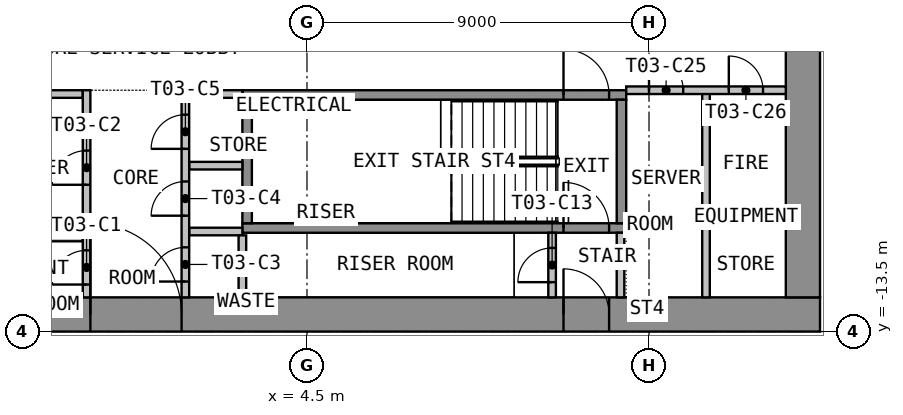
"""IFC4 building model, lengths in metres.
Left out: names, types, materials, properties, quantities, classifications, styles, units other than length and angle.
Written with IfcOpenShell. Run it as: python <this file> out.ifc"""

import sys

from ifc_helpers import new_model, si_unit, direction, frame, frame_2d, origin, place, context, subcontext, project, spatial, rectangle, extrude, element, fill, save


model = new_model("IFC4")
c1 = context("Model", 3, precision=1e-05, world=origin(), true_north=direction((0.0, 1.0)))
c2 = subcontext(c1, "Body", "Model", "MODEL_VIEW")
j1 = project(units=[si_unit("LENGTHUNIT", "METRE"), si_unit("PLANEANGLEUNIT", "RADIAN")], contexts=[c1])
p1 = place(None, origin())
s1 = spatial("IfcSite", under=j1, at=p1, CompositionType="ELEMENT")
p2 = place(p1, origin())
s2 = spatial("IfcBuilding", under=s1, at=p2, CompositionType="ELEMENT")
p3 = place(p2, frame((0.0, 0.0, 53.4)))
s3 = spatial("IfcBuildingStorey", under=s2, at=p3, CompositionType="ELEMENT", Elevation=53.4)
p4 = place(p3, frame((-18.0, -13.05, 0.0), z_axis=(0.0, 0.0, 1.0), x_axis=(1.0, 0.0, 0.0)))
e1 = element("IfcWall", 1, at=p4, inside=s3, PredefinedType="SHEAR", context=c2, shape_type="SweptSolid", body=[
    extrude(rectangle(XDim=36.0, YDim=0.9, at=frame_2d((18.0, 0.0))), origin(), (0.0, 0.0, 1.0), 3.525),
])
p5 = place(p4, frame((16.8, 0.0, 0.0)))
e2 = element("IfcOpeningElement", 2, at=p5, cuts=e1, PredefinedType="OPENING", context=c2, shape_type="SweptSolid", body=[
    extrude(rectangle(XDim=2.4, YDim=2.1, at=frame_2d((1.2, 1.05))), frame((0.0, 0.46, 0.0), z_axis=(0.0, -1.0, 0.0), x_axis=(1.0, 0.0, 0.0)), (0.0, 0.0, 1.0), 0.92),
])
p6 = place(p4, frame((5.55, 0.0, 0.0)))
e3 = element("IfcOpeningElement", 3, at=p6, cuts=e1, PredefinedType="OPENING", context=c2, shape_type="SweptSolid", body=[
    extrude(rectangle(XDim=1.2, YDim=2.1, at=frame_2d((0.6, 1.05))), frame((0.0, 0.46, 0.0), z_axis=(0.0, -1.0, 0.0), x_axis=(1.0, 0.0, 0.0)), (0.0, 0.0, 1.0), 0.92),
])
p7 = place(p4, frame((29.25, 0.0, 0.0)))
e4 = element("IfcOpeningElement", 4, at=p7, cuts=e1, PredefinedType="OPENING", context=c2, shape_type="SweptSolid", body=[
    extrude(rectangle(XDim=1.2, YDim=2.1, at=frame_2d((0.6, 1.05))), frame((0.0, 0.46, 0.0), z_axis=(0.0, -1.0, 0.0), x_axis=(1.0, 0.0, 0.0)), (0.0, 0.0, 1.0), 0.92),
])
p8 = place(p3, frame((17.55, -12.6, 0.0), z_axis=(0.0, 0.0, 1.0), x_axis=(0.0, 1.0, 0.0)))
e5 = element("IfcWall", 5, at=p8, inside=s3, PredefinedType="SHEAR", context=c2, shape_type="SweptSolid", body=[
    extrude(rectangle(XDim=25.2, YDim=0.9, at=frame_2d((12.6, 0.0))), origin(), (0.0, 0.0, 1.0), 3.525),
])
p9 = place(p8, frame((11.4, 0.0, 0.0)))
e6 = element("IfcOpeningElement", 6, at=p9, cuts=e5, PredefinedType="OPENING", context=c2, shape_type="SweptSolid", body=[
    extrude(rectangle(XDim=2.4, YDim=2.1, at=frame_2d((1.2, 1.05))), frame((0.0, 0.46, 0.0), z_axis=(0.0, -1.0, 0.0), x_axis=(1.0, 0.0, 0.0)), (0.0, 0.0, 1.0), 0.92),
])
p10 = place(p3, frame((2.8, -10.775, 0.0), z_axis=(0.0, 0.0, 1.0), x_axis=(1.0, 0.0, 0.0)))
e7 = element("IfcWall", 7, at=p10, inside=s3, PredefinedType="SHEAR", context=c2, shape_type="SweptSolid", body=[
    extrude(rectangle(XDim=10.1, YDim=0.25, at=frame_2d((5.05, 0.0))), origin(), (0.0, 0.0, 1.0), 3.525),
])
p11 = place(p10, frame((8.45, 0.0, 0.0)))
e8 = element("IfcOpeningElement", 8, at=p11, cuts=e7, PredefinedType="OPENING", context=c2, shape_type="SweptSolid", body=[
    extrude(rectangle(XDim=1.2, YDim=2.1, at=frame_2d((0.6, 1.05))), frame((0.0, 0.135, 0.0), z_axis=(0.0, -1.0, 0.0), x_axis=(1.0, 0.0, 0.0)), (0.0, 0.0, 1.0), 0.27),
])
p12 = place(p3, frame((2.8, -7.275, 0.0), z_axis=(0.0, 0.0, 1.0), x_axis=(1.0, 0.0, 0.0)))
e9 = element("IfcWall", 9, at=p12, inside=s3, PredefinedType="SHEAR", context=c2, shape_type="SweptSolid", body=[
    extrude(rectangle(XDim=10.1, YDim=0.25, at=frame_2d((5.05, 0.0))), origin(), (0.0, 0.0, 1.0), 3.525),
])
p13 = place(p12, frame((8.45, 0.0, 0.0)))
e10 = element("IfcOpeningElement", 10, at=p13, cuts=e9, PredefinedType="OPENING", context=c2, shape_type="SweptSolid", body=[
    extrude(rectangle(XDim=1.2, YDim=2.1, at=frame_2d((0.6, 1.05))), frame((0.0, 0.135, 0.0), z_axis=(0.0, -1.0, 0.0), x_axis=(1.0, 0.0, 0.0)), (0.0, 0.0, 1.0), 0.27),
])
for number, where, z_axis, x_axis in (
    (11, (2.925, -10.65, 0.0), (0.0, 0.0, 1.0), (0.0, 1.0, 0.0)),
    (12, (12.775, -10.65, 0.0), (0.0, 0.0, 1.0), (0.0, 1.0, 0.0)),
):
    element("IfcWall", number, at=place(p3, frame(where, z_axis=z_axis, x_axis=x_axis)), inside=s3, PredefinedType="SHEAR", context=c2, shape_type="SweptSolid", body=[
        extrude(rectangle(XDim=3.25, YDim=0.25, at=frame_2d((1.625, 0.0))), origin(), (0.0, 0.0, 1.0), 3.525),
    ])
for number, where, z_axis, x_axis in (
    (13, (-2.8, -7.25, 0.0), (0.0, 0.0, 1.0), (1.0, 0.0, 0.0)),
    (14, (-2.8, -11.025, 0.0), (0.0, 0.0, 1.0), (1.0, 0.0, 0.0)),
    (15, (1.4, -7.25, 0.0), (0.0, 0.0, 1.0), (1.0, 0.0, 0.0)),
    (16, (1.4, -9.135, 0.0), (0.0, 0.0, 1.0), (1.0, 0.0, 0.0)),
    (17, (1.4, -10.867, 0.0), (0.0, 0.0, 1.0), (1.0, 0.0, 0.0)),
):
    element("IfcWall", number, at=place(p3, frame(where, z_axis=z_axis, x_axis=x_axis)), inside=s3, PredefinedType="PARTITIONING", context=c2, shape_type="SweptSolid", body=[
        extrude(rectangle(XDim=1.4, YDim=0.2, at=frame_2d((0.7, 0.0))), origin(), (0.0, 0.0, 1.0), 3.525),
    ])
p14 = place(p3, frame((-1.3, -12.6, 0.0), z_axis=(0.0, 0.0, 1.0), x_axis=(0.0, 1.0, 0.0)))
e18 = element("IfcWall", 18, at=p14, inside=s3, PredefinedType="PARTITIONING", context=c2, shape_type="SweptSolid", body=[
    extrude(rectangle(XDim=5.45, YDim=0.2, at=frame_2d((2.725, 0.0))), origin(), (0.0, 0.0, 1.0), 3.525),
])
p15 = place(p14, frame((0.337, 0.0, 0.0)))
e19 = element("IfcOpeningElement", 19, at=p15, cuts=e18, PredefinedType="OPENING", context=c2, shape_type="SweptSolid", body=[
    extrude(rectangle(XDim=0.9, YDim=2.1, at=frame_2d((0.45, 1.05))), frame((0.0, 0.11, 0.0), z_axis=(0.0, -1.0, 0.0), x_axis=(1.0, 0.0, 0.0)), (0.0, 0.0, 1.0), 0.22),
])
p16 = place(p14, frame((2.962, 0.0, 0.0)))
e20 = element("IfcOpeningElement", 20, at=p16, cuts=e18, PredefinedType="OPENING", context=c2, shape_type="SweptSolid", body=[
    extrude(rectangle(XDim=0.9, YDim=2.1, at=frame_2d((0.45, 1.05))), frame((0.0, 0.11, 0.0), z_axis=(0.0, -1.0, 0.0), x_axis=(1.0, 0.0, 0.0)), (0.0, 0.0, 1.0), 0.22),
])
p17 = place(p3, frame((1.3, -12.6, 0.0), z_axis=(0.0, 0.0, 1.0), x_axis=(0.0, 1.0, 0.0)))
e21 = element("IfcWall", 21, at=p17, inside=s3, PredefinedType="PARTITIONING", context=c2, shape_type="SweptSolid", body=[
    extrude(rectangle(XDim=5.45, YDim=0.2, at=frame_2d((2.725, 0.0))), origin(), (0.0, 0.0, 1.0), 3.525),
])
p18 = place(p17, frame((0.416, 0.0, 0.0)))
e22 = element("IfcOpeningElement", 22, at=p18, cuts=e21, PredefinedType="OPENING", context=c2, shape_type="SweptSolid", body=[
    extrude(rectangle(XDim=0.9, YDim=2.1, at=frame_2d((0.45, 1.05))), frame((0.0, 0.11, 0.0), z_axis=(0.0, -1.0, 0.0), x_axis=(1.0, 0.0, 0.0)), (0.0, 0.0, 1.0), 0.22),
])
p19 = place(p17, frame((2.149, 0.0, 0.0)))
e23 = element("IfcOpeningElement", 23, at=p19, cuts=e21, PredefinedType="OPENING", context=c2, shape_type="SweptSolid", body=[
    extrude(rectangle(XDim=0.9, YDim=2.1, at=frame_2d((0.45, 1.05))), frame((0.0, 0.11, 0.0), z_axis=(0.0, -1.0, 0.0), x_axis=(1.0, 0.0, 0.0)), (0.0, 0.0, 1.0), 0.22),
])
p20 = place(p17, frame((3.907, 0.0, 0.0)))
e24 = element("IfcOpeningElement", 24, at=p20, cuts=e21, PredefinedType="OPENING", context=c2, shape_type="SweptSolid", body=[
    extrude(rectangle(XDim=0.9, YDim=2.1, at=frame_2d((0.45, 1.05))), frame((0.0, 0.11, 0.0), z_axis=(0.0, -1.0, 0.0), x_axis=(1.0, 0.0, 0.0)), (0.0, 0.0, 1.0), 0.22),
])
p21 = place(p3, frame((12.75, -12.6, 0.0), z_axis=(0.0, 0.0, 1.0), x_axis=(0.0, 1.0, 0.0)))
e25 = element("IfcWall", 25, at=p21, inside=s3, PredefinedType="PARTITIONING", context=c2, shape_type="SweptSolid", body=[
    extrude(rectangle(XDim=1.7, YDim=0.2, at=frame_2d((0.85, 0.0))), origin(), (0.0, 0.0, 1.0), 3.525),
])
p22 = place(p3, frame((10.95, -12.6, 0.0), z_axis=(0.0, 0.0, 1.0), x_axis=(0.0, 1.0, 0.0)))
e26 = element("IfcWall", 26, at=p22, inside=s3, PredefinedType="PARTITIONING", context=c2, shape_type="SweptSolid", body=[
    extrude(rectangle(XDim=1.7, YDim=0.2, at=frame_2d((0.85, 0.0))), origin(), (0.0, 0.0, 1.0), 3.525),
])
p23 = place(p22, frame((0.4, 0.0, 0.0)))
e27 = element("IfcOpeningElement", 27, at=p23, cuts=e26, PredefinedType="OPENING", context=c2, shape_type="SweptSolid", body=[
    extrude(rectangle(XDim=0.9, YDim=2.1, at=frame_2d((0.45, 1.05))), frame((0.0, 0.11, 0.0), z_axis=(0.0, -1.0, 0.0), x_axis=(1.0, 0.0, 0.0)), (0.0, 0.0, 1.0), 0.22),
])
p24 = place(p3, frame((15.0, -12.6, 0.0), z_axis=(0.0, 0.0, 1.0), x_axis=(0.0, 1.0, 0.0)))
e28 = element("IfcWall", 28, at=p24, inside=s3, PredefinedType="PARTITIONING", context=c2, shape_type="SweptSolid", body=[
    extrude(rectangle(XDim=5.45, YDim=0.2, at=frame_2d((2.725, 0.0))), origin(), (0.0, 0.0, 1.0), 3.525),
])
p25 = place(p3, frame((12.9, -7.15, 0.0), z_axis=(0.0, 0.0, 1.0), x_axis=(1.0, 0.0, 0.0)))
e29 = element("IfcWall", 29, at=p25, inside=s3, PredefinedType="PARTITIONING", context=c2, shape_type="SweptSolid", body=[
    extrude(rectangle(XDim=4.2, YDim=0.2, at=frame_2d((2.1, 0.0))), origin(), (0.0, 0.0, 1.0), 3.525),
])
p26 = place(p25, frame((0.6, 0.0, 0.0)))
e30 = element("IfcOpeningElement", 30, at=p26, cuts=e29, PredefinedType="OPENING", context=c2, shape_type="SweptSolid", body=[
    extrude(rectangle(XDim=0.9, YDim=2.1, at=frame_2d((0.45, 1.05))), frame((0.0, 0.11, 0.0), z_axis=(0.0, -1.0, 0.0), x_axis=(1.0, 0.0, 0.0)), (0.0, 0.0, 1.0), 0.22),
])
p27 = place(p25, frame((2.7, 0.0, 0.0)))
e31 = element("IfcOpeningElement", 31, at=p27, cuts=e29, PredefinedType="OPENING", context=c2, shape_type="SweptSolid", body=[
    extrude(rectangle(XDim=0.9, YDim=2.1, at=frame_2d((0.45, 1.05))), frame((0.0, 0.11, 0.0), z_axis=(0.0, -1.0, 0.0), x_axis=(1.0, 0.0, 0.0)), (0.0, 0.0, 1.0), 0.22),
])
p28 = place(p3, frame((2.8, -10.969, 0.0), z_axis=(0.0, 0.0, 1.0), x_axis=(0.0, -1.0, 0.0)))
e32 = element("IfcWall", 32, at=p28, inside=s3, PredefinedType="PARTITIONING", context=c2, shape_type="SweptSolid", body=[
    extrude(rectangle(XDim=1.631, YDim=0.2, at=frame_2d((0.815, 0.0))), origin(), (0.0, 0.0, 1.0), 3.525),
])
p29 = place(p5, origin())
e33 = element("IfcDoor", 33, at=p29, inside=s3, OperationType="DOUBLE_DOOR_DOUBLE_SWING", PredefinedType="DOOR", context=c2, shape_type="SweptSolid", body=[
    extrude(rectangle(XDim=2.4, YDim=2.1, at=frame_2d((1.2, 1.05))), frame((0.0, 0.025, 0.0), z_axis=(0.0, -1.0, 0.0), x_axis=(1.0, 0.0, 0.0)), (0.0, 0.0, 1.0), 0.05),
])
fill(e2, e33)
p30 = place(p7, origin())
e34 = element("IfcDoor", 34, at=p30, inside=s3, OperationType="SINGLE_SWING_RIGHT", PredefinedType="DOOR", context=c2, shape_type="SweptSolid", body=[
    extrude(rectangle(XDim=1.2, YDim=2.1, at=frame_2d((0.6, 1.05))), frame((0.0, 0.025, 0.0), z_axis=(0.0, -1.0, 0.0), x_axis=(1.0, 0.0, 0.0)), (0.0, 0.0, 1.0), 0.05),
])
fill(e4, e34)
p31 = place(p13, origin())
e35 = element("IfcDoor", 35, at=p31, inside=s3, OperationType="SINGLE_SWING_LEFT", PredefinedType="DOOR", context=c2, shape_type="SweptSolid", body=[
    extrude(rectangle(XDim=1.2, YDim=2.1, at=frame_2d((0.6, 1.05))), frame((0.0, 0.025, 0.0), z_axis=(0.0, -1.0, 0.0), x_axis=(1.0, 0.0, 0.0)), (0.0, 0.0, 1.0), 0.05),
])
fill(e10, e35)
p32 = place(p15, origin())
e36 = element("IfcDoor", 36, at=p32, inside=s3, OperationType="SINGLE_SWING_LEFT", PredefinedType="DOOR", context=c2, shape_type="SweptSolid", body=[
    extrude(rectangle(XDim=0.9, YDim=2.1, at=frame_2d((0.45, 1.05))), frame((0.0, 0.025, 0.0), z_axis=(0.0, -1.0, 0.0), x_axis=(1.0, 0.0, 0.0)), (0.0, 0.0, 1.0), 0.05),
])
fill(e19, e36)
p33 = place(p16, origin())
e37 = element("IfcDoor", 37, at=p33, inside=s3, OperationType="SINGLE_SWING_LEFT", PredefinedType="DOOR", context=c2, shape_type="SweptSolid", body=[
    extrude(rectangle(XDim=0.9, YDim=2.1, at=frame_2d((0.45, 1.05))), frame((0.0, 0.025, 0.0), z_axis=(0.0, -1.0, 0.0), x_axis=(1.0, 0.0, 0.0)), (0.0, 0.0, 1.0), 0.05),
])
fill(e20, e37)
p34 = place(p18, origin())
e38 = element("IfcDoor", 38, at=p34, inside=s3, OperationType="SINGLE_SWING_LEFT", PredefinedType="DOOR", context=c2, shape_type="SweptSolid", body=[
    extrude(rectangle(XDim=0.9, YDim=2.1, at=frame_2d((0.45, 1.05))), frame((0.0, 0.025, 0.0), z_axis=(0.0, -1.0, 0.0), x_axis=(1.0, 0.0, 0.0)), (0.0, 0.0, 1.0), 0.05),
])
fill(e22, e38)
p35 = place(p19, origin())
e39 = element("IfcDoor", 39, at=p35, inside=s3, OperationType="SINGLE_SWING_LEFT", PredefinedType="DOOR", context=c2, shape_type="SweptSolid", body=[
    extrude(rectangle(XDim=0.9, YDim=2.1, at=frame_2d((0.45, 1.05))), frame((0.0, 0.025, 0.0), z_axis=(0.0, -1.0, 0.0), x_axis=(1.0, 0.0, 0.0)), (0.0, 0.0, 1.0), 0.05),
])
fill(e23, e39)
p36 = place(p20, origin())
e40 = element("IfcDoor", 40, at=p36, inside=s3, OperationType="SINGLE_SWING_LEFT", PredefinedType="DOOR", context=c2, shape_type="SweptSolid", body=[
    extrude(rectangle(XDim=0.9, YDim=2.1, at=frame_2d((0.45, 1.05))), frame((0.0, 0.025, 0.0), z_axis=(0.0, -1.0, 0.0), x_axis=(1.0, 0.0, 0.0)), (0.0, 0.0, 1.0), 0.05),
])
fill(e24, e40)
p37 = place(p11, origin())
e41 = element("IfcDoor", 41, at=p37, inside=s3, OperationType="SINGLE_SWING_RIGHT", PredefinedType="DOOR", context=c2, shape_type="SweptSolid", body=[
    extrude(rectangle(XDim=1.2, YDim=2.1, at=frame_2d((0.6, 1.05))), frame((0.0, 0.025, 0.0), z_axis=(0.0, -1.0, 0.0), x_axis=(1.0, 0.0, 0.0)), (0.0, 0.0, 1.0), 0.05),
])
fill(e8, e41)
p38 = place(p23, origin())
e42 = element("IfcDoor", 42, at=p38, inside=s3, OperationType="SINGLE_SWING_LEFT", PredefinedType="DOOR", context=c2, shape_type="SweptSolid", body=[
    extrude(rectangle(XDim=0.9, YDim=2.1, at=frame_2d((0.45, 1.05))), frame((0.0, 0.025, 0.0), z_axis=(0.0, -1.0, 0.0), x_axis=(1.0, 0.0, 0.0)), (0.0, 0.0, 1.0), 0.05),
])
fill(e27, e42)
p39 = place(p26, origin())
e43 = element("IfcDoor", 43, at=p39, inside=s3, OperationType="SINGLE_SWING_LEFT", PredefinedType="DOOR", context=c2, shape_type="SweptSolid", body=[
    extrude(rectangle(XDim=0.9, YDim=2.1, at=frame_2d((0.45, 1.05))), frame((0.0, 0.025, 0.0), z_axis=(0.0, -1.0, 0.0), x_axis=(1.0, 0.0, 0.0)), (0.0, 0.0, 1.0), 0.05),
])
fill(e30, e43)
p40 = place(p27, origin())
e44 = element("IfcDoor", 44, at=p40, inside=s3, OperationType="SINGLE_SWING_LEFT", PredefinedType="DOOR", context=c2, shape_type="SweptSolid", body=[
    extrude(rectangle(XDim=0.9, YDim=2.1, at=frame_2d((0.45, 1.05))), frame((0.0, 0.025, 0.0), z_axis=(0.0, -1.0, 0.0), x_axis=(1.0, 0.0, 0.0)), (0.0, 0.0, 1.0), 0.05),
])
fill(e31, e44)
save(model, sys.argv[1])
